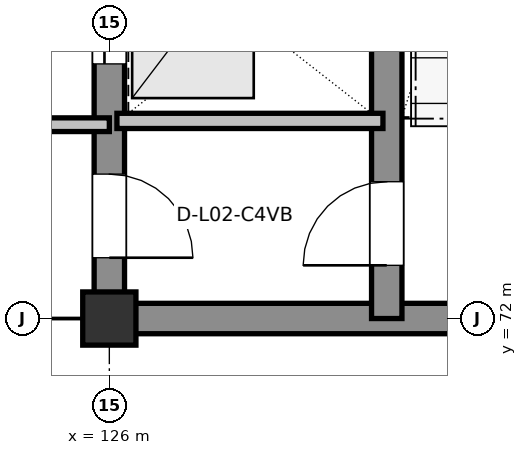
"""IFC4 building model, lengths in metres.
Left out: names, types, materials, properties, quantities, classifications, styles, units other than length and angle.
Written with IfcOpenShell. Run it as: python <this file> out.ifc"""

import sys

from ifc_helpers import new_model, si_unit, direction, frame, frame_2d, origin, origin_2d, place, context, subcontext, project, spatial, rectangle, extrude, element, fill, save


model = new_model("IFC4")
c1 = context("Model", 3, precision=1e-05, world=origin(), true_north=direction((0.0, 1.0)))
c2 = subcontext(c1, "Body", "Model", "MODEL_VIEW")
j1 = project(units=[si_unit("LENGTHUNIT", "METRE"), si_unit("PLANEANGLEUNIT", "RADIAN")], contexts=[c1])
p1 = place(None, origin())
s1 = spatial("IfcSite", under=j1, at=p1, CompositionType="ELEMENT")
p2 = place(p1, origin())
s2 = spatial("IfcBuilding", under=s1, at=p2, CompositionType="ELEMENT")
p3 = place(p2, frame((0.0, 0.0, 10.2)))
s3 = spatial("IfcBuildingStorey", under=s2, at=p3, CompositionType="ELEMENT", Elevation=10.2)
p4 = place(p3, frame((126.0, 72.0, 0.0), z_axis=(0.0, 0.0, 1.0), x_axis=(1.0, 0.0, 0.0)))
e1 = element("IfcColumn", 1, at=p4, inside=s3, PredefinedType="COLUMN", context=c2, shape_type="SweptSolid", body=[
    extrude(rectangle(XDim=0.7, YDim=0.7, at=origin_2d()), origin(), (0.0, 0.0, 1.0), 4.8),
])
p5 = place(p3, frame((126.0, 72.0, 0.0), z_axis=(0.0, 0.0, 1.0), x_axis=(1.0, 0.0, 0.0)))
e2 = element("IfcWall", 2, at=p5, inside=s3, PredefinedType="SHEAR", context=c2, shape_type="SweptSolid", body=[
    extrude(rectangle(XDim=9.0, YDim=0.4, at=frame_2d((4.5, 0.0))), origin(), (0.0, 0.0, 1.0), 4.56),
])
p6 = place(p3, frame((126.0, 90.0, 0.0), z_axis=(0.0, 0.0, 1.0), x_axis=(0.0, -1.0, 0.0)))
e3 = element("IfcWall", 3, at=p6, inside=s3, PredefinedType="SHEAR", context=c2, shape_type="SweptSolid", body=[
    extrude(rectangle(XDim=18.0, YDim=0.4, at=frame_2d((9.0, 0.0))), origin(), (0.0, 0.0, 1.0), 4.56),
])
p7 = place(p6, frame((16.1, 0.0, 0.0)))
e4 = element("IfcOpeningElement", 4, at=p7, cuts=e3, PredefinedType="OPENING", context=c2, shape_type="SweptSolid", body=[
    extrude(rectangle(XDim=1.1, YDim=2.16, at=frame_2d((0.55, 1.08))), frame((0.0, 0.21, 0.0), z_axis=(0.0, -1.0, 0.0), x_axis=(1.0, 0.0, 0.0)), (0.0, 0.0, 1.0), 0.42),
])
p8 = place(p6, frame((13.45, 0.0, 0.0)))
e5 = element("IfcOpeningElement", 5, at=p8, cuts=e3, PredefinedType="OPENING", context=c2, shape_type="SweptSolid", body=[
    extrude(rectangle(XDim=1.2, YDim=2.2, at=frame_2d((0.6, 1.1))), frame((0.0, 0.21, 0.0), z_axis=(0.0, -1.0, 0.0), x_axis=(1.0, 0.0, 0.0)), (0.0, 0.0, 1.0), 0.42),
])
p9 = place(p6, frame((10.65, 0.0, 0.0)))
e6 = element("IfcOpeningElement", 6, at=p9, cuts=e3, PredefinedType="OPENING", context=c2, shape_type="SweptSolid", body=[
    extrude(rectangle(XDim=1.2, YDim=2.2, at=frame_2d((0.6, 1.1))), frame((0.0, 0.21, 0.0), z_axis=(0.0, -1.0, 0.0), x_axis=(1.0, 0.0, 0.0)), (0.0, 0.0, 1.0), 0.42),
])
p10 = place(p6, frame((5.9, 0.0, 0.0)))
e7 = element("IfcOpeningElement", 7, at=p10, cuts=e3, PredefinedType="OPENING", context=c2, shape_type="SweptSolid", body=[
    extrude(rectangle(XDim=1.8, YDim=2.35, at=frame_2d((0.9, 1.175))), frame((0.0, 0.21, 0.0), z_axis=(0.0, -1.0, 0.0), x_axis=(1.0, 0.0, 0.0)), (0.0, 0.0, 1.0), 0.42),
])
p11 = place(p3, frame((129.65, 72.0, 0.0), z_axis=(0.0, 0.0, 1.0), x_axis=(0.0, 1.0, 0.0)))
e8 = element("IfcWall", 8, at=p11, inside=s3, PredefinedType="SHEAR", context=c2, shape_type="SweptSolid", body=[
    extrude(rectangle(XDim=18.0, YDim=0.4, at=frame_2d((9.0, 0.0))), origin(), (0.0, 0.0, 1.0), 4.56),
])
p12 = place(p11, frame((0.7, 0.0, 0.0)))
e9 = element("IfcOpeningElement", 9, at=p12, cuts=e8, PredefinedType="OPENING", context=c2, shape_type="SweptSolid", body=[
    extrude(rectangle(XDim=1.1, YDim=2.16, at=frame_2d((0.55, 1.08))), frame((0.0, 0.21, 0.0), z_axis=(0.0, -1.0, 0.0), x_axis=(1.0, 0.0, 0.0)), (0.0, 0.0, 1.0), 0.42),
])
p13 = place(p3, frame((126.1, 74.6, 0.0), z_axis=(0.0, 0.0, 1.0), x_axis=(1.0, 0.0, 0.0)))
e10 = element("IfcWall", 10, at=p13, inside=s3, PredefinedType="PARTITIONING", context=c2, shape_type="SweptSolid", body=[
    extrude(rectangle(XDim=3.5, YDim=0.2, at=frame_2d((1.75, 0.0))), origin(), (0.0, 0.0, 1.0), 4.56),
])
p14 = place(p3, frame((122.25, 74.55, 0.0), z_axis=(0.0, 0.0, 1.0), x_axis=(1.0, 0.0, 0.0)))
e11 = element("IfcWall", 11, at=p14, inside=s3, PredefinedType="PARTITIONING", context=c2, shape_type="SweptSolid", body=[
    extrude(rectangle(XDim=3.75, YDim=0.18, at=frame_2d((1.875, 0.0))), origin(), (0.0, 0.0, 1.0), 4.56),
])
p15 = place(p12, origin())
e12 = element("IfcDoor", 12, at=p15, inside=s3, OperationType="SINGLE_SWING_LEFT", PredefinedType="DOOR", context=c2, shape_type="SweptSolid", body=[
    extrude(rectangle(XDim=1.1, YDim=2.16, at=frame_2d((0.55, 1.08))), frame((0.0, 0.025, 0.0), z_axis=(0.0, -1.0, 0.0), x_axis=(1.0, 0.0, 0.0)), (0.0, 0.0, 1.0), 0.05),
])
fill(e9, e12)
p16 = place(p7, origin())
e13 = element("IfcDoor", 13, at=p16, inside=s3, OperationType="SINGLE_SWING_RIGHT", PredefinedType="DOOR", context=c2, shape_type="SweptSolid", body=[
    extrude(rectangle(XDim=1.1, YDim=2.16, at=frame_2d((0.55, 1.08))), frame((0.0, 0.025, 0.0), z_axis=(0.0, -1.0, 0.0), x_axis=(1.0, 0.0, 0.0)), (0.0, 0.0, 1.0), 0.05),
])
fill(e4, e13)
p17 = place(p8, origin())
e14 = element("IfcDoor", 14, at=p17, inside=s3, OperationType="SLIDING_TO_LEFT", PredefinedType="DOOR", context=c2, shape_type="SweptSolid", body=[
    extrude(rectangle(XDim=1.2, YDim=2.2, at=frame_2d((0.6, 1.1))), frame((0.0, 0.025, 0.0), z_axis=(0.0, -1.0, 0.0), x_axis=(1.0, 0.0, 0.0)), (0.0, 0.0, 1.0), 0.05),
])
fill(e5, e14)
save(model, sys.argv[1])
